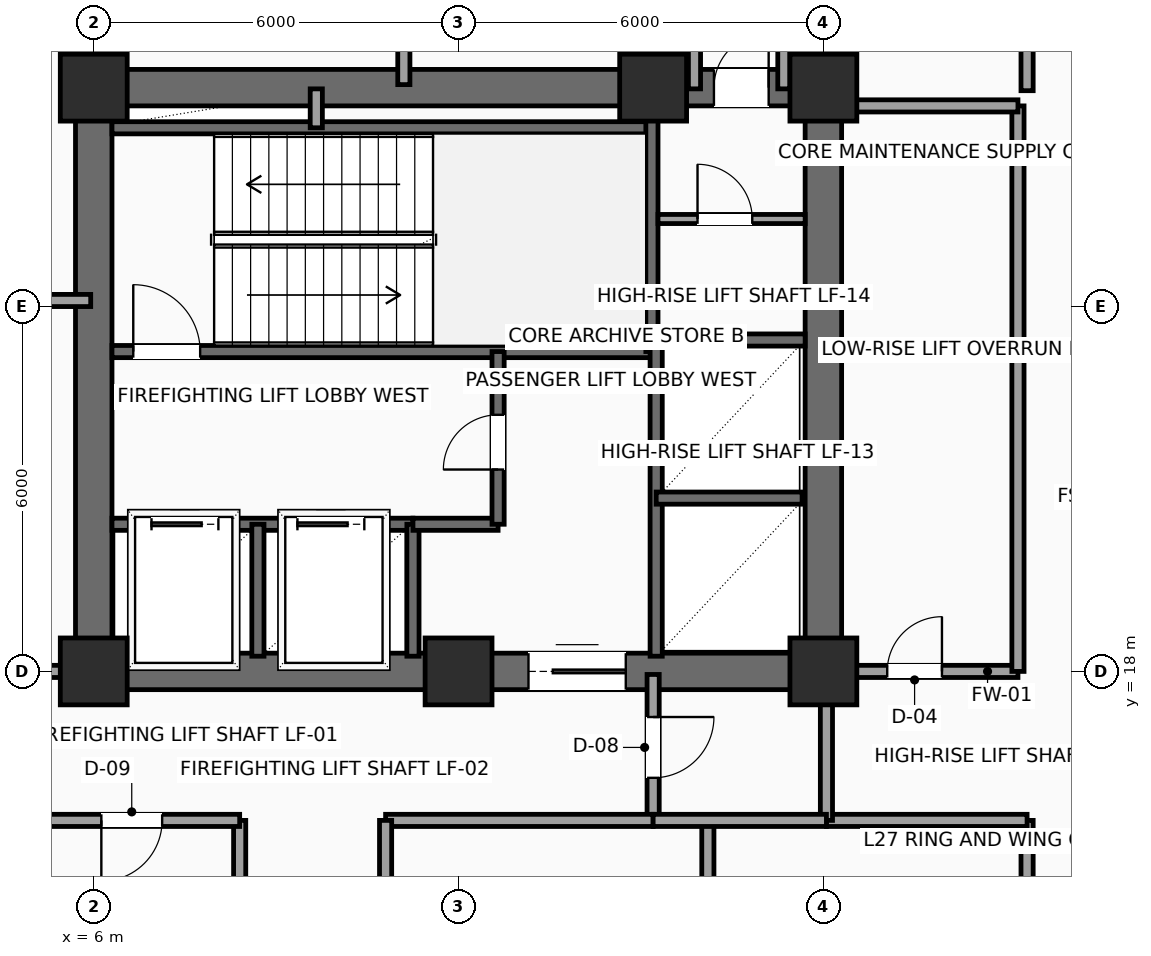
"""IFC4 building model, lengths in metres.
Left out: names, types, materials, properties, quantities, classifications, styles, units other than length and angle.
Written with IfcOpenShell. Run it as: python <this file> out.ifc"""

import sys

from ifc_helpers import new_model, si_unit, direction, frame, frame_2d, origin, origin_2d, place, context, subcontext, project, spatial, rectangle, extrude, element, fill, save


model = new_model("IFC4")
c1 = context("Model", 3, precision=1e-05, world=origin(), true_north=direction((0.0, 1.0)))
c2 = subcontext(c1, "Body", "Model", "MODEL_VIEW")
j1 = project(units=[si_unit("LENGTHUNIT", "METRE"), si_unit("PLANEANGLEUNIT", "RADIAN")], contexts=[c1])
p1 = place(None, origin())
s1 = spatial("IfcSite", under=j1, at=p1, CompositionType="ELEMENT")
p2 = place(p1, origin())
s2 = spatial("IfcBuilding", under=s1, at=p2, CompositionType="ELEMENT")
p3 = place(p2, frame((0.0, 0.0, 115.65)))
s3 = spatial("IfcBuildingStorey", under=s2, at=p3, CompositionType="ELEMENT", Elevation=115.65)
for number, where, z_axis, x_axis in (
    (1, (6.0, 18.0, 0.0), (0.0, 0.0, 1.0), (1.0, 0.0, 0.0)),
    (2, (12.0, 18.0, 0.0), (0.0, 0.0, 1.0), (1.0, 0.0, 0.0)),
    (3, (18.0, 18.0, 0.0), (0.0, 0.0, 1.0), (1.0, 0.0, 0.0)),
    (4, (6.0, 27.6, 0.0), (0.0, 0.0, 1.0), (1.0, 0.0, 0.0)),
    (5, (15.2, 27.6, 0.0), (0.0, 0.0, 1.0), (1.0, 0.0, 0.0)),
    (6, (18.0, 27.6, 0.0), (0.0, 0.0, 1.0), (1.0, 0.0, 0.0)),
):
    element("IfcColumn", number, at=place(p3, frame(where, z_axis=z_axis, x_axis=x_axis)), inside=s3, PredefinedType="COLUMN", context=c2, shape_type="SweptSolid", body=[
        extrude(rectangle(XDim=1.1, YDim=1.1, at=origin_2d()), origin(), (0.0, 0.0, 1.0), 3.75),
    ])
p4 = place(p3, frame((6.0, 18.0, 0.0), z_axis=(0.0, 0.0, 1.0), x_axis=(1.0, 0.0, 0.0)))
e7 = element("IfcWall", 7, at=p4, inside=s3, PredefinedType="SHEAR", context=c2, shape_type="SweptSolid", body=[
    extrude(rectangle(XDim=12.0, YDim=0.6, at=frame_2d((6.0, 0.0))), origin(), (0.0, 0.0, 1.0), 3.525),
])
p5 = place(p4, frame((7.15, 0.0, 0.0)))
e8 = element("IfcOpeningElement", 8, at=p5, cuts=e7, PredefinedType="OPENING", context=c2, shape_type="SweptSolid", body=[
    extrude(rectangle(XDim=1.6, YDim=2.3, at=frame_2d((0.8, 1.15))), frame((0.0, 0.31, 0.0), z_axis=(0.0, -1.0, 0.0), x_axis=(1.0, 0.0, 0.0)), (0.0, 0.0, 1.0), 0.62),
])
p6 = place(p3, frame((6.0, 27.6, 0.0), z_axis=(0.0, 0.0, 1.0), x_axis=(1.0, 0.0, 0.0)))
e9 = element("IfcWall", 9, at=p6, inside=s3, PredefinedType="SHEAR", context=c2, shape_type="SweptSolid", body=[
    extrude(rectangle(XDim=12.0, YDim=0.6, at=frame_2d((6.0, 0.0))), origin(), (0.0, 0.0, 1.0), 3.525),
])
p7 = place(p6, frame((10.2, 0.0, 0.0)))
e10 = element("IfcOpeningElement", 10, at=p7, cuts=e9, PredefinedType="OPENING", context=c2, shape_type="SweptSolid", body=[
    extrude(rectangle(XDim=0.9, YDim=2.15, at=frame_2d((0.45, 1.075))), frame((0.0, 0.31, 0.0), z_axis=(0.0, -1.0, 0.0), x_axis=(1.0, 0.0, 0.0)), (0.0, 0.0, 1.0), 0.62),
])
for number, where, z_axis, x_axis in (
    (11, (6.0, 18.0, 0.0), (0.0, 0.0, 1.0), (0.0, 1.0, 0.0)),
    (12, (18.0, 18.0, 0.0), (0.0, 0.0, 1.0), (0.0, 1.0, 0.0)),
):
    element("IfcWall", number, at=place(p3, frame(where, z_axis=z_axis, x_axis=x_axis)), inside=s3, PredefinedType="SHEAR", context=c2, shape_type="SweptSolid", body=[
        extrude(rectangle(XDim=9.6, YDim=0.6, at=frame_2d((4.8, 0.0))), origin(), (0.0, 0.0, 1.0), 3.525),
    ])
p8 = place(p3, frame((6.3, 23.26, 0.0), z_axis=(0.0, 0.0, 1.0), x_axis=(1.0, 0.0, 0.0)))
e13 = element("IfcWall", 13, at=p8, inside=s3, PredefinedType="SHEAR", context=c2, shape_type="SweptSolid", body=[
    extrude(rectangle(XDim=8.88, YDim=0.2, at=frame_2d((4.44, 0.0))), origin(), (0.0, 0.0, 1.0), 3.525),
])
p9 = place(p8, frame((0.35, 0.0, 0.0)))
e14 = element("IfcOpeningElement", 14, at=p9, cuts=e13, PredefinedType="OPENING", context=c2, shape_type="SweptSolid", body=[
    extrude(rectangle(XDim=1.1, YDim=2.2, at=frame_2d((0.55, 1.1))), frame((0.0, 0.11, 0.0), z_axis=(0.0, -1.0, 0.0), x_axis=(1.0, 0.0, 0.0)), (0.0, 0.0, 1.0), 0.22),
])
p10 = place(p3, frame((6.3, 26.94, 0.0), z_axis=(0.0, 0.0, 1.0), x_axis=(1.0, 0.0, 0.0)))
e15 = element("IfcWall", 15, at=p10, inside=s3, PredefinedType="SHEAR", context=c2, shape_type="SweptSolid", body=[
    extrude(rectangle(XDim=8.88, YDim=0.2, at=frame_2d((4.44, 0.0))), origin(), (0.0, 0.0, 1.0), 3.525),
])
p11 = place(p3, frame((15.18, 23.26, 0.0), z_axis=(0.0, 0.0, 1.0), x_axis=(0.0, 1.0, 0.0)))
e16 = element("IfcWall", 16, at=p11, inside=s3, PredefinedType="SHEAR", context=c2, shape_type="SweptSolid", body=[
    extrude(rectangle(XDim=4.04, YDim=0.2, at=frame_2d((2.02, 0.0))), origin(), (0.0, 0.0, 1.0), 3.525),
])
p12 = place(p3, frame((6.3, 20.42, 0.0), z_axis=(0.0, 0.0, 1.0), x_axis=(1.0, 0.0, 0.0)))
e17 = element("IfcWall", 17, at=p12, inside=s3, PredefinedType="SHEAR", context=c2, shape_type="SweptSolid", body=[
    extrude(rectangle(XDim=4.95, YDim=0.2, at=frame_2d((2.475, 0.0))), origin(), (0.0, 0.0, 1.0), 3.525),
])
p13 = place(p12, frame((0.65, 0.0, 0.0)))
e18 = element("IfcOpeningElement", 18, at=p13, cuts=e17, PredefinedType="OPENING", context=c2, shape_type="SweptSolid", body=[
    extrude(rectangle(XDim=1.1, YDim=2.2, at=frame_2d((0.55, 1.1))), frame((0.0, 0.11, 0.0), z_axis=(0.0, -1.0, 0.0), x_axis=(1.0, 0.0, 0.0)), (0.0, 0.0, 1.0), 0.22),
])
p14 = place(p12, frame((3.05, 0.0, 0.0)))
e19 = element("IfcOpeningElement", 19, at=p14, cuts=e17, PredefinedType="OPENING", context=c2, shape_type="SweptSolid", body=[
    extrude(rectangle(XDim=1.1, YDim=2.2, at=frame_2d((0.55, 1.1))), frame((0.0, 0.11, 0.0), z_axis=(0.0, -1.0, 0.0), x_axis=(1.0, 0.0, 0.0)), (0.0, 0.0, 1.0), 0.22),
])
for number, where, z_axis, x_axis in (
    (20, (8.7, 18.25, 0.0), (0.0, 0.0, 1.0), (0.0, 1.0, 0.0)),
    (21, (11.25, 18.25, 0.0), (0.0, 0.0, 1.0), (0.0, 1.0, 0.0)),
):
    element("IfcWall", number, at=place(p3, frame(where, z_axis=z_axis, x_axis=x_axis)), inside=s3, PredefinedType="SHEAR", context=c2, shape_type="SweptSolid", body=[
        extrude(rectangle(XDim=2.17, YDim=0.2, at=frame_2d((1.085, 0.0))), origin(), (0.0, 0.0, 1.0), 3.525),
    ])
p15 = place(p3, frame((11.25, 20.42, 0.0), z_axis=(0.0, 0.0, 1.0), x_axis=(1.0, 0.0, 0.0)))
e22 = element("IfcWall", 22, at=p15, inside=s3, PredefinedType="SHEAR", context=c2, shape_type="SweptSolid", body=[
    extrude(rectangle(XDim=1.4, YDim=0.2, at=frame_2d((0.7, 0.0))), origin(), (0.0, 0.0, 1.0), 3.525),
])
p16 = place(p3, frame((12.65, 20.42, 0.0), z_axis=(0.0, 0.0, 1.0), x_axis=(0.0, 1.0, 0.0)))
e23 = element("IfcWall", 23, at=p16, inside=s3, PredefinedType="SHEAR", context=c2, shape_type="SweptSolid", body=[
    extrude(rectangle(XDim=2.84, YDim=0.2, at=frame_2d((1.42, 0.0))), origin(), (0.0, 0.0, 1.0), 3.525),
])
p17 = place(p16, frame((0.9, 0.0, 0.0)))
e24 = element("IfcOpeningElement", 24, at=p17, cuts=e23, PredefinedType="OPENING", context=c2, shape_type="SweptSolid", body=[
    extrude(rectangle(XDim=0.9, YDim=2.15, at=frame_2d((0.45, 1.075))), frame((0.0, 0.11, 0.0), z_axis=(0.0, -1.0, 0.0), x_axis=(1.0, 0.0, 0.0)), (0.0, 0.0, 1.0), 0.22),
])
p18 = place(p3, frame((9.66, 26.94, 0.0), z_axis=(0.0, 0.0, 1.0), x_axis=(0.0, 1.0, 0.0)))
e25 = element("IfcWall", 25, at=p18, inside=s3, PredefinedType="SOLIDWALL", context=c2, shape_type="SweptSolid", body=[
    extrude(rectangle(XDim=0.64, YDim=0.2, at=frame_2d((0.32, 0.0))), origin(), (0.0, 0.0, 1.0), 3.525),
])
p19 = place(p3, frame((15.25, 18.25, 0.0), z_axis=(0.0, 0.0, 1.0), x_axis=(0.0, 1.0, 0.0)))
e26 = element("IfcWall", 26, at=p19, inside=s3, PredefinedType="SHEAR", context=c2, shape_type="SweptSolid", body=[
    extrude(rectangle(XDim=5.2, YDim=0.2, at=frame_2d((2.6, 0.0))), origin(), (0.0, 0.0, 1.0), 3.525),
])
p20 = place(p3, frame((15.25, 20.85, 0.0), z_axis=(0.0, 0.0, 1.0), x_axis=(1.0, 0.0, 0.0)))
e27 = element("IfcWall", 27, at=p20, inside=s3, PredefinedType="SHEAR", context=c2, shape_type="SweptSolid", body=[
    extrude(rectangle(XDim=2.4, YDim=0.2, at=frame_2d((1.2, 0.0))), origin(), (0.0, 0.0, 1.0), 3.525),
])
p21 = place(p3, frame((15.25, 23.45, 0.0), z_axis=(0.0, 0.0, 1.0), x_axis=(1.0, 0.0, 0.0)))
e28 = element("IfcWall", 28, at=p21, inside=s3, PredefinedType="SHEAR", context=c2, shape_type="SweptSolid", body=[
    extrude(rectangle(XDim=2.45, YDim=0.2, at=frame_2d((1.225, 0.0))), origin(), (0.0, 0.0, 1.0), 3.525),
])
p22 = place(p3, frame((15.28, 25.44, 0.0), z_axis=(0.0, 0.0, 1.0), x_axis=(1.0, 0.0, 0.0)))
e29 = element("IfcWall", 29, at=p22, inside=s3, PredefinedType="PARTITIONING", context=c2, shape_type="SweptSolid", body=[
    extrude(rectangle(XDim=2.42, YDim=0.15, at=frame_2d((1.21, 0.0))), origin(), (0.0, 0.0, 1.0), 3.525),
])
p23 = place(p22, frame((0.65, 0.0, 0.0)))
e30 = element("IfcOpeningElement", 30, at=p23, cuts=e29, PredefinedType="OPENING", context=c2, shape_type="SweptSolid", body=[
    extrude(rectangle(XDim=0.9, YDim=2.15, at=frame_2d((0.45, 1.075))), frame((0.0, 0.085, 0.0), z_axis=(0.0, -1.0, 0.0), x_axis=(1.0, 0.0, 0.0)), (0.0, 0.0, 1.0), 0.17),
])
p24 = place(p3, frame((18.1, 18.0, 0.0), z_axis=(0.0, 0.0, 1.0), x_axis=(1.0, 0.0, 0.0)))
e31 = element("IfcWall", 31, at=p24, inside=s3, PredefinedType="SOLIDWALL", context=c2, shape_type="SweptSolid", body=[
    extrude(rectangle(XDim=3.1, YDim=0.2, at=frame_2d((1.55, 0.0))), origin(), (0.0, 0.0, 1.0), 3.017),
])
p25 = place(p24, frame((0.95, 0.0, 0.0)))
e32 = element("IfcOpeningElement", 32, at=p25, cuts=e31, PredefinedType="OPENING", context=c2, shape_type="SweptSolid", body=[
    extrude(rectangle(XDim=0.9, YDim=2.15, at=frame_2d((0.45, 1.075))), frame((0.0, 0.11, 0.0), z_axis=(0.0, -1.0, 0.0), x_axis=(1.0, 0.0, 0.0)), (0.0, 0.0, 1.0), 0.22),
])
p26 = place(p3, frame((21.2, 18.0, 0.0), z_axis=(0.0, 0.0, 1.0), x_axis=(0.0, 1.0, 0.0)))
e33 = element("IfcWall", 33, at=p26, inside=s3, PredefinedType="SOLIDWALL", context=c2, shape_type="SweptSolid", body=[
    extrude(rectangle(XDim=9.3, YDim=0.2, at=frame_2d((4.65, 0.0))), origin(), (0.0, 0.0, 1.0), 3.525),
])
p27 = place(p3, frame((18.1, 27.3, 0.0), z_axis=(0.0, 0.0, 1.0), x_axis=(1.0, 0.0, 0.0)))
e34 = element("IfcWall", 34, at=p27, inside=s3, PredefinedType="SOLIDWALL", context=c2, shape_type="SweptSolid", body=[
    extrude(rectangle(XDim=3.1, YDim=0.2, at=frame_2d((1.55, 0.0))), origin(), (0.0, 0.0, 1.0), 3.525),
])
p28 = place(p3, frame((8.4, 11.25, 0.0), z_axis=(0.0, 0.0, 1.0), x_axis=(0.0, 1.0, 0.0)))
e35 = element("IfcWall", 35, at=p28, inside=s3, PredefinedType="SOLIDWALL", context=c2, shape_type="SweptSolid", body=[
    extrude(rectangle(XDim=4.3, YDim=0.2, at=frame_2d((2.15, 0.0))), origin(), (0.0, 0.0, 1.0), 3.525),
])
p29 = place(p3, frame((8.4, 15.55, 0.0), z_axis=(0.0, 0.0, 1.0), x_axis=(-1.0, 0.0, 0.0)))
e36 = element("IfcWall", 36, at=p29, inside=s3, PredefinedType="SOLIDWALL", context=c2, shape_type="SweptSolid", body=[
    extrude(rectangle(XDim=8.1, YDim=0.2, at=frame_2d((4.05, 0.0))), origin(), (0.0, 0.0, 1.0), 3.525),
])
p30 = place(p29, frame((5.3, 0.0, 0.0)))
e37 = element("IfcOpeningElement", 37, at=p30, cuts=e36, PredefinedType="OPENING", context=c2, shape_type="SweptSolid", body=[
    extrude(rectangle(XDim=1.0, YDim=2.2, at=frame_2d((0.5, 1.1))), frame((0.0, 0.11, 0.0), z_axis=(0.0, -1.0, 0.0), x_axis=(1.0, 0.0, 0.0)), (0.0, 0.0, 1.0), 0.22),
])
p31 = place(p29, frame((1.275, 0.0, 0.0)))
e38 = element("IfcOpeningElement", 38, at=p31, cuts=e36, PredefinedType="OPENING", context=c2, shape_type="SweptSolid", body=[
    extrude(rectangle(XDim=1.0, YDim=2.2, at=frame_2d((0.5, 1.1))), frame((0.0, 0.11, 0.0), z_axis=(0.0, -1.0, 0.0), x_axis=(1.0, 0.0, 0.0)), (0.0, 0.0, 1.0), 0.22),
])
p32 = place(p3, frame((15.2, 17.95, 0.0), z_axis=(0.0, 0.0, 1.0), x_axis=(0.0, -1.0, 0.0)))
e39 = element("IfcWall", 39, at=p32, inside=s3, PredefinedType="SOLIDWALL", context=c2, shape_type="SweptSolid", body=[
    extrude(rectangle(XDim=2.4, YDim=0.2, at=frame_2d((1.2, 0.0))), origin(), (0.0, 0.0, 1.0), 3.525),
])
p33 = place(p32, frame((0.7, 0.0, 0.0)))
e40 = element("IfcOpeningElement", 40, at=p33, cuts=e39, PredefinedType="OPENING", context=c2, shape_type="SweptSolid", body=[
    extrude(rectangle(XDim=1.0, YDim=2.2, at=frame_2d((0.5, 1.1))), frame((0.0, 0.11, 0.0), z_axis=(0.0, -1.0, 0.0), x_axis=(1.0, 0.0, 0.0)), (0.0, 0.0, 1.0), 0.22),
])
p34 = place(p3, frame((15.2, 15.55, 0.0), z_axis=(0.0, 0.0, 1.0), x_axis=(-1.0, 0.0, 0.0)))
e41 = element("IfcWall", 41, at=p34, inside=s3, PredefinedType="SOLIDWALL", context=c2, shape_type="SweptSolid", body=[
    extrude(rectangle(XDim=4.4, YDim=0.2, at=frame_2d((2.2, 0.0))), origin(), (0.0, 0.0, 1.0), 3.525),
])
for number, where, z_axis, x_axis in (
    (42, (10.8, 15.55, 0.0), (0.0, 0.0, 1.0), (0.0, -1.0, 0.0)),
    (43, (21.35, 11.25, 0.0), (0.0, 0.0, 1.0), (0.0, 1.0, 0.0)),
):
    element("IfcWall", number, at=place(p3, frame(where, z_axis=z_axis, x_axis=x_axis)), inside=s3, PredefinedType="SOLIDWALL", context=c2, shape_type="SweptSolid", body=[
        extrude(rectangle(XDim=4.3, YDim=0.2, at=frame_2d((2.15, 0.0))), origin(), (0.0, 0.0, 1.0), 3.525),
    ])
p35 = place(p3, frame((21.35, 15.55, 0.0), z_axis=(0.0, 0.0, 1.0), x_axis=(-1.0, 0.0, 0.0)))
e44 = element("IfcWall", 44, at=p35, inside=s3, PredefinedType="SOLIDWALL", context=c2, shape_type="SweptSolid", body=[
    extrude(rectangle(XDim=3.3, YDim=0.2, at=frame_2d((1.65, 0.0))), origin(), (0.0, 0.0, 1.0), 3.525),
])
p36 = place(p3, frame((18.05, 15.55, 0.0), z_axis=(0.0, 0.0, 1.0), x_axis=(0.0, 1.0, 0.0)))
e45 = element("IfcWall", 45, at=p36, inside=s3, PredefinedType="SOLIDWALL", context=c2, shape_type="SweptSolid", body=[
    extrude(rectangle(XDim=2.41, YDim=0.2, at=frame_2d((1.205, 0.0))), origin(), (0.0, 0.0, 1.0), 3.017),
])
for number, where, z_axis, x_axis in (
    (46, (17.35, 30.25, 0.0), (0.0, 0.0, 1.0), (0.0, -1.0, 0.0)),
    (47, (15.88, 27.58, 0.0), (0.0, 0.0, 1.0), (0.0, 1.0, 0.0)),
):
    element("IfcWall", number, at=place(p3, frame(where, z_axis=z_axis, x_axis=x_axis)), inside=s3, PredefinedType="SOLIDWALL", context=c2, shape_type="SweptSolid", body=[
        extrude(rectangle(XDim=2.67, YDim=0.2, at=frame_2d((1.335, 0.0))), origin(), (0.0, 0.0, 1.0), 3.525),
    ])
p37 = place(p3, frame((16.1, 11.25, 0.0), z_axis=(0.0, 0.0, 1.0), x_axis=(0.0, 1.0, 0.0)))
e48 = element("IfcWall", 48, at=p37, inside=s3, PredefinedType="PARTITIONING", context=c2, shape_type="SweptSolid", body=[
    extrude(rectangle(XDim=4.3, YDim=0.2, at=frame_2d((2.15, 0.0))), origin(), (0.0, 0.0, 1.0), 3.525),
])
p38 = place(p3, frame((0.3, 18.0, 0.0), z_axis=(0.0, 0.0, 1.0), x_axis=(1.0, 0.0, 0.0)))
e49 = element("IfcWall", 49, at=p38, inside=s3, PredefinedType="PARTITIONING", context=c2, shape_type="SweptSolid", body=[
    extrude(rectangle(XDim=5.65, YDim=0.2, at=frame_2d((2.825, 0.0))), origin(), (0.0, 0.0, 1.0), 3.017),
])
p39 = place(p38, frame((2.35, 0.0, 0.0)))
e50 = element("IfcOpeningElement", 50, at=p39, cuts=e49, PredefinedType="OPENING", context=c2, shape_type="SweptSolid", body=[
    extrude(rectangle(XDim=1.0, YDim=2.2, at=frame_2d((0.5, 1.1))), frame((0.0, 0.11, 0.0), z_axis=(0.0, -1.0, 0.0), x_axis=(1.0, 0.0, 0.0)), (0.0, 0.0, 1.0), 0.22),
])
p40 = place(p3, frame((0.3, 24.1, 0.0), z_axis=(0.0, 0.0, 1.0), x_axis=(1.0, 0.0, 0.0)))
e51 = element("IfcWall", 51, at=p40, inside=s3, PredefinedType="PARTITIONING", context=c2, shape_type="SweptSolid", body=[
    extrude(rectangle(XDim=5.65, YDim=0.2, at=frame_2d((2.825, 0.0))), origin(), (0.0, 0.0, 1.0), 3.525),
])
p41 = place(p3, frame((6.3, 27.65, 0.0), z_axis=(0.0, 0.0, 1.0), x_axis=(0.0, 1.0, 0.0)))
e52 = element("IfcWall", 52, at=p41, inside=s3, PredefinedType="PARTITIONING", context=c2, shape_type="SweptSolid", body=[
    extrude(rectangle(XDim=2.6, YDim=0.2, at=frame_2d((1.3, 0.0))), origin(), (0.0, 0.0, 1.0), 3.017),
])
p42 = place(p3, frame((11.1, 27.65, 0.0), z_axis=(0.0, 0.0, 1.0), x_axis=(0.0, 1.0, 0.0)))
e53 = element("IfcWall", 53, at=p42, inside=s3, PredefinedType="PARTITIONING", context=c2, shape_type="SweptSolid", body=[
    extrude(rectangle(XDim=2.6, YDim=0.2, at=frame_2d((1.3, 0.0))), origin(), (0.0, 0.0, 1.0), 3.525),
])
p43 = place(p3, frame((21.35, 27.55, 0.0), z_axis=(0.0, 0.0, 1.0), x_axis=(0.0, 1.0, 0.0)))
e54 = element("IfcWall", 54, at=p43, inside=s3, PredefinedType="PARTITIONING", context=c2, shape_type="SweptSolid", body=[
    extrude(rectangle(XDim=2.7, YDim=0.2, at=frame_2d((1.35, 0.0))), origin(), (0.0, 0.0, 1.0), 3.525),
])
p44 = place(p3, frame((15.2, 15.55, 0.0), z_axis=(0.0, 0.0, 1.0), x_axis=(1.0, 0.0, 0.0)))
e55 = element("IfcWall", 55, at=p44, inside=s3, PredefinedType="PARTITIONING", context=c2, shape_type="SweptSolid", body=[
    extrude(rectangle(XDim=2.85, YDim=0.2, at=frame_2d((1.425, 0.0))), origin(), (0.0, 0.0, 1.0), 3.525),
])
p45 = place(p5, origin())
e56 = element("IfcDoor", 56, at=p45, inside=s3, OperationType="DOUBLE_DOOR_SLIDING", PredefinedType="DOOR", context=c2, shape_type="SweptSolid", body=[
    extrude(rectangle(XDim=1.6, YDim=2.3, at=frame_2d((0.8, 1.15))), frame((0.0, 0.025, 0.0), z_axis=(0.0, -1.0, 0.0), x_axis=(1.0, 0.0, 0.0)), (0.0, 0.0, 1.0), 0.05),
])
fill(e8, e56)
p46 = place(p7, origin())
e57 = element("IfcDoor", 57, at=p46, inside=s3, OperationType="SINGLE_SWING_RIGHT", PredefinedType="DOOR", context=c2, shape_type="SweptSolid", body=[
    extrude(rectangle(XDim=0.9, YDim=2.15, at=frame_2d((0.45, 1.075))), frame((0.0, 0.025, 0.0), z_axis=(0.0, -1.0, 0.0), x_axis=(1.0, 0.0, 0.0)), (0.0, 0.0, 1.0), 0.05),
])
fill(e10, e57)
p47 = place(p9, origin())
e58 = element("IfcDoor", 58, at=p47, inside=s3, OperationType="SINGLE_SWING_LEFT", PredefinedType="DOOR", context=c2, shape_type="SweptSolid", body=[
    extrude(rectangle(XDim=1.1, YDim=2.2, at=frame_2d((0.55, 1.1))), frame((0.0, 0.025, 0.0), z_axis=(0.0, -1.0, 0.0), x_axis=(1.0, 0.0, 0.0)), (0.0, 0.0, 1.0), 0.05),
])
fill(e14, e58)
p48 = place(p13, origin())
e59 = element("IfcDoor", 59, at=p48, inside=s3, OperationType="SLIDING_TO_LEFT", PredefinedType="DOOR", context=c2, shape_type="SweptSolid", body=[
    extrude(rectangle(XDim=1.1, YDim=2.2, at=frame_2d((0.55, 1.1))), frame((0.0, 0.025, 0.0), z_axis=(0.0, -1.0, 0.0), x_axis=(1.0, 0.0, 0.0)), (0.0, 0.0, 1.0), 0.05),
])
fill(e18, e59)
p49 = place(p14, origin())
e60 = element("IfcDoor", 60, at=p49, inside=s3, OperationType="SLIDING_TO_LEFT", PredefinedType="DOOR", context=c2, shape_type="SweptSolid", body=[
    extrude(rectangle(XDim=1.1, YDim=2.2, at=frame_2d((0.55, 1.1))), frame((0.0, 0.025, 0.0), z_axis=(0.0, -1.0, 0.0), x_axis=(1.0, 0.0, 0.0)), (0.0, 0.0, 1.0), 0.05),
])
fill(e19, e60)
p50 = place(p17, origin())
e61 = element("IfcDoor", 61, at=p50, inside=s3, OperationType="SINGLE_SWING_LEFT", PredefinedType="DOOR", context=c2, shape_type="SweptSolid", body=[
    extrude(rectangle(XDim=0.9, YDim=2.15, at=frame_2d((0.45, 1.075))), frame((0.0, 0.025, 0.0), z_axis=(0.0, -1.0, 0.0), x_axis=(1.0, 0.0, 0.0)), (0.0, 0.0, 1.0), 0.05),
])
fill(e24, e61)
p51 = place(p23, origin())
e62 = element("IfcDoor", 62, at=p51, inside=s3, OperationType="SINGLE_SWING_LEFT", PredefinedType="DOOR", context=c2, shape_type="SweptSolid", body=[
    extrude(rectangle(XDim=0.9, YDim=2.15, at=frame_2d((0.45, 1.075))), frame((0.0, 0.025, 0.0), z_axis=(0.0, -1.0, 0.0), x_axis=(1.0, 0.0, 0.0)), (0.0, 0.0, 1.0), 0.05),
])
fill(e30, e62)
p52 = place(p25, origin())
e63 = element("IfcDoor", 63, at=p52, inside=s3, OperationType="SINGLE_SWING_RIGHT", PredefinedType="DOOR", context=c2, shape_type="SweptSolid", body=[
    extrude(rectangle(XDim=0.9, YDim=2.15, at=frame_2d((0.45, 1.075))), frame((0.0, 0.025, 0.0), z_axis=(0.0, -1.0, 0.0), x_axis=(1.0, 0.0, 0.0)), (0.0, 0.0, 1.0), 0.05),
])
fill(e32, e63)
p53 = place(p31, origin())
e64 = element("IfcDoor", 64, at=p53, inside=s3, OperationType="SINGLE_SWING_RIGHT", PredefinedType="DOOR", context=c2, shape_type="SweptSolid", body=[
    extrude(rectangle(XDim=1.0, YDim=2.2, at=frame_2d((0.5, 1.1))), frame((0.0, 0.025, 0.0), z_axis=(0.0, -1.0, 0.0), x_axis=(1.0, 0.0, 0.0)), (0.0, 0.0, 1.0), 0.05),
])
fill(e38, e64)
p54 = place(p33, origin())
e65 = element("IfcDoor", 65, at=p54, inside=s3, OperationType="SINGLE_SWING_LEFT", PredefinedType="DOOR", context=c2, shape_type="SweptSolid", body=[
    extrude(rectangle(XDim=1.0, YDim=2.2, at=frame_2d((0.5, 1.1))), frame((0.0, 0.025, 0.0), z_axis=(0.0, -1.0, 0.0), x_axis=(1.0, 0.0, 0.0)), (0.0, 0.0, 1.0), 0.05),
])
fill(e40, e65)
save(model, sys.argv[1])
